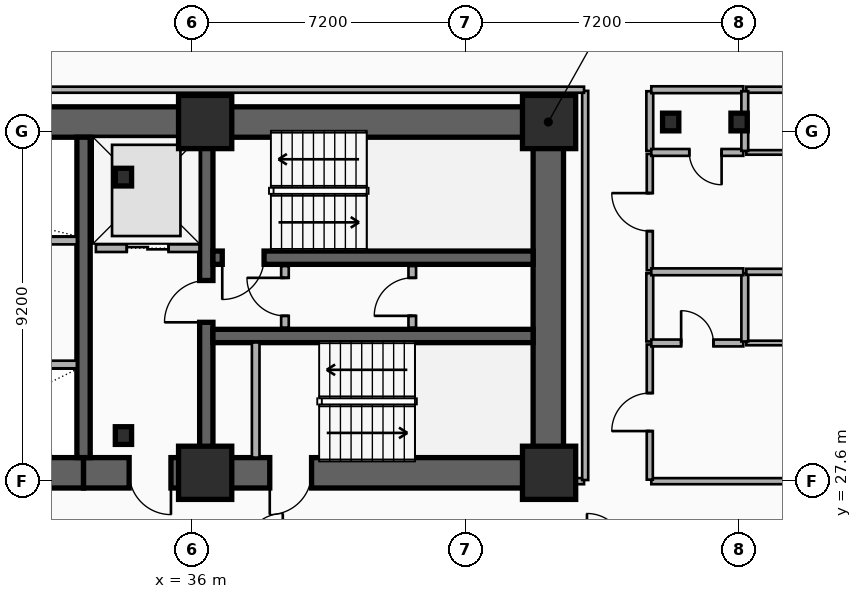
"""IFC4 building model, lengths in metres.
Left out: names, types, materials, properties, quantities, classifications, styles, units other than length and angle.
Written with IfcOpenShell. Run it as: python <this file> out.ifc"""

import sys

from ifc_helpers import new_model, si_unit, direction, frame, frame_2d, origin, origin_2d, place, context, subcontext, project, spatial, rectangle, i_section, extrude, element, fill, save


model = new_model("IFC4")
c1 = context("Model", 3, precision=1e-05, world=origin(), true_north=direction((0.0, 1.0)))
c2 = subcontext(c1, "Body", "Model", "MODEL_VIEW")
j1 = project(units=[si_unit("LENGTHUNIT", "METRE"), si_unit("PLANEANGLEUNIT", "RADIAN")], contexts=[c1])
p1 = place(None, origin())
s1 = spatial("IfcSite", under=j1, at=p1, CompositionType="ELEMENT")
p2 = place(p1, origin())
s2 = spatial("IfcBuilding", under=s1, at=p2, CompositionType="ELEMENT")
p3 = place(p2, frame((0.0, 0.0, 32.5)))
s3 = spatial("IfcBuildingStorey", under=s2, at=p3, CompositionType="ELEMENT", Elevation=32.5)
p4 = place(p3, frame((12.15, 37.05, 0.0), z_axis=(0.0, 0.0, 1.0), x_axis=(1.0, 0.0, 0.0)))
e1 = element("IfcWall", 1, at=p4, inside=s3, PredefinedType="SHEAR", context=c2, shape_type="SweptSolid", body=[
    extrude(rectangle(XDim=33.23, YDim=0.8, at=frame_2d((16.615, 0.0))), origin(), (0.0, 0.0, 1.0), 3.5),
])
p5 = place(p3, frame((33.15, 27.82, 0.0), z_axis=(0.0, 0.0, 1.0), x_axis=(-1.0, 0.0, 0.0)))
e2 = element("IfcWall", 2, at=p5, inside=s3, PredefinedType="SHEAR", context=c2, shape_type="SweptSolid", body=[
    extrude(rectangle(XDim=11.97, YDim=0.8, at=frame_2d((5.985, 0.0))), origin(), (0.0, 0.0, 1.0), 3.5),
])
p6 = place(p5, frame((6.1, 0.0, 0.0)))
e3 = element("IfcOpeningElement", 3, at=p6, cuts=e2, PredefinedType="OPENING", context=c2, shape_type="SweptSolid", body=[
    extrude(rectangle(XDim=1.6, YDim=2.2, at=frame_2d((0.8, 1.1))), frame((0.0, 0.41, 0.0), z_axis=(0.0, -1.0, 0.0), x_axis=(1.0, 0.0, 0.0)), (0.0, 0.0, 1.0), 0.82),
])
p7 = place(p3, frame((45.38, 27.82, 0.0), z_axis=(0.0, 0.0, 1.0), x_axis=(-1.0, 0.0, 0.0)))
e4 = element("IfcWall", 4, at=p7, inside=s3, PredefinedType="SHEAR", context=c2, shape_type="SweptSolid", body=[
    extrude(rectangle(XDim=12.23, YDim=0.8, at=frame_2d((6.115, 0.0))), origin(), (0.0, 0.0, 1.0), 3.5),
])
p8 = place(p7, frame((9.93, 0.0, 0.0)))
e5 = element("IfcOpeningElement", 5, at=p8, cuts=e4, PredefinedType="OPENING", context=c2, shape_type="SweptSolid", body=[
    extrude(rectangle(XDim=1.1, YDim=2.15, at=frame_2d((0.55, 1.075))), frame((0.0, 0.41, 0.0), z_axis=(0.0, -1.0, 0.0), x_axis=(1.0, 0.0, 0.0)), (0.0, 0.0, 1.0), 0.82),
])
p9 = place(p7, frame((6.23, 0.0, 0.0)))
e6 = element("IfcOpeningElement", 6, at=p9, cuts=e4, PredefinedType="OPENING", context=c2, shape_type="SweptSolid", body=[
    extrude(rectangle(XDim=1.1, YDim=2.15, at=frame_2d((0.55, 1.075))), frame((0.0, 0.41, 0.0), z_axis=(0.0, -1.0, 0.0), x_axis=(1.0, 0.0, 0.0)), (0.0, 0.0, 1.0), 0.82),
])
p10 = place(p3, frame((45.38, 28.22, 0.0), z_axis=(0.0, 0.0, 1.0), x_axis=(0.0, 1.0, 0.0)))
e7 = element("IfcWall", 7, at=p10, inside=s3, PredefinedType="SHEAR", context=c2, shape_type="SweptSolid", body=[
    extrude(rectangle(XDim=8.43, YDim=0.8, at=frame_2d((4.215, 0.0))), origin(), (0.0, 0.0, 1.0), 3.5),
])
p11 = place(p3, frame((33.15, 28.22, 0.0), z_axis=(0.0, 0.0, 1.0), x_axis=(0.0, 1.0, 0.0)))
e8 = element("IfcWall", 8, at=p11, inside=s3, PredefinedType="SHEAR", context=c2, shape_type="SweptSolid", body=[
    extrude(rectangle(XDim=8.43, YDim=0.35, at=frame_2d((4.215, 0.0))), origin(), (0.0, 0.0, 1.0), 3.5),
])
p12 = place(p3, frame((36.38, 28.22, 0.0), z_axis=(0.0, 0.0, 1.0), x_axis=(0.0, 1.0, 0.0)))
e9 = element("IfcWall", 9, at=p12, inside=s3, PredefinedType="SHEAR", context=c2, shape_type="SweptSolid", body=[
    extrude(rectangle(XDim=8.43, YDim=0.35, at=frame_2d((4.215, 0.0))), origin(), (0.0, 0.0, 1.0), 3.5),
])
p13 = place(p12, frame((3.56, 0.0, 0.0)))
e10 = element("IfcOpeningElement", 10, at=p13, cuts=e9, PredefinedType="OPENING", context=c2, shape_type="SweptSolid", body=[
    extrude(rectangle(XDim=1.1, YDim=2.15, at=frame_2d((0.55, 1.075))), frame((0.0, 0.185, 0.0), z_axis=(0.0, -1.0, 0.0), x_axis=(1.0, 0.0, 0.0)), (0.0, 0.0, 1.0), 0.37),
])
p14 = place(p3, frame((44.98, 33.48, 0.0), z_axis=(0.0, 0.0, 1.0), x_axis=(-1.0, 0.0, 0.0)))
e11 = element("IfcWall", 11, at=p14, inside=s3, PredefinedType="SHEAR", context=c2, shape_type="SweptSolid", body=[
    extrude(rectangle(XDim=8.425, YDim=0.35, at=frame_2d((4.212, 0.0))), origin(), (0.0, 0.0, 1.0), 3.5),
])
p15 = place(p14, frame((7.08, 0.0, 0.0)))
e12 = element("IfcOpeningElement", 12, at=p15, cuts=e11, PredefinedType="OPENING", context=c2, shape_type="SweptSolid", body=[
    extrude(rectangle(XDim=1.1, YDim=2.15, at=frame_2d((0.55, 1.075))), frame((0.0, 0.185, 0.0), z_axis=(0.0, -1.0, 0.0), x_axis=(1.0, 0.0, 0.0)), (0.0, 0.0, 1.0), 0.37),
])
p16 = place(p3, frame((36.555, 31.42, 0.0), z_axis=(0.0, 0.0, 1.0), x_axis=(1.0, 0.0, 0.0)))
e13 = element("IfcWall", 13, at=p16, inside=s3, PredefinedType="SHEAR", context=c2, shape_type="SweptSolid", body=[
    extrude(rectangle(XDim=8.425, YDim=0.35, at=frame_2d((4.212, 0.0))), origin(), (0.0, 0.0, 1.0), 3.5),
])
for number, where, z_axis, x_axis in (
    (14, (34.2, 28.8, 0.0), (0.0, 0.0, 1.0), (1.0, 0.0, 0.0)),
    (15, (34.2, 35.6, 0.0), (0.0, 0.0, 1.0), (1.0, 0.0, 0.0)),
):
    element("IfcColumn", number, at=place(p3, frame(where, z_axis=z_axis, x_axis=x_axis)), inside=s3, PredefinedType="COLUMN", context=c2, shape_type="SweptSolid", body=[
        extrude(i_section(OverallWidth=0.428, OverallDepth=0.465, WebThickness=0.045, FlangeThickness=0.073, FilletRadius=0.015, at=origin_2d()), origin(), (0.0, 0.0, 1.0), 3.5),
    ])
for number, where, z_axis, x_axis in (
    (16, (36.35, 27.82, 0.0), (0.0, 0.0, 1.0), (1.0, 0.0, 0.0)),
    (17, (36.35, 37.05, 0.0), (0.0, 0.0, 1.0), (1.0, 0.0, 0.0)),
    (18, (45.4, 27.82, 0.0), (0.0, 0.0, 1.0), (1.0, 0.0, 0.0)),
    (19, (45.4, 37.05, 0.0), (0.0, 0.0, 1.0), (1.0, 0.0, 0.0)),
):
    element("IfcColumn", number, at=place(p3, frame(where, z_axis=z_axis, x_axis=x_axis)), inside=s3, PredefinedType="COLUMN", context=c2, shape_type="SweptSolid", body=[
        extrude(rectangle(XDim=1.4, YDim=1.4, at=origin_2d()), origin(), (0.0, 0.0, 1.0), 3.5),
    ])
for number, where, z_axis, x_axis in (
    (20, (48.6, 37.05, 0.0), (0.0, 0.0, 1.0), (1.0, 0.0, 0.0)),
    (21, (50.4, 37.05, 0.0), (0.0, 0.0, 1.0), (1.0, 0.0, 0.0)),
):
    element("IfcColumn", number, at=place(p3, frame(where, z_axis=z_axis, x_axis=x_axis)), inside=s3, PredefinedType="COLUMN", context=c2, shape_type="SweptSolid", body=[
        extrude(i_section(OverallWidth=0.428, OverallDepth=0.465, WebThickness=0.045, FlangeThickness=0.073, FilletRadius=0.015, at=origin_2d()), origin(), (0.0, 0.0, 1.0), 3.5),
    ])
p17 = place(p3, frame((33.475, 33.73, 0.0), z_axis=(0.0, 0.0, 1.0), x_axis=(1.0, 0.0, 0.0)))
e22 = element("IfcWall", 22, at=p17, inside=s3, PredefinedType="PARTITIONING", context=c2, shape_type="SweptSolid", body=[
    extrude(rectangle(XDim=2.725, YDim=0.2, at=frame_2d((1.362, 0.0))), origin(), (0.0, 0.0, 1.0), 2.212),
])
p18 = place(p17, frame((0.812, 0.0, 0.0)))
e23 = element("IfcOpeningElement", 23, at=p18, cuts=e22, PredefinedType="OPENING", context=c2, shape_type="SweptSolid", body=[
    extrude(rectangle(XDim=1.1, YDim=2.15, at=frame_2d((0.55, 1.075))), frame((0.0, 0.11, 0.0), z_axis=(0.0, -1.0, 0.0), x_axis=(1.0, 0.0, 0.0)), (0.0, 0.0, 1.0), 0.22),
])
p19 = place(p3, frame((31.775, 30.67, 0.0), z_axis=(0.0, 0.0, 1.0), x_axis=(1.0, 0.0, 0.0)))
e24 = element("IfcWall", 24, at=p19, inside=s3, PredefinedType="PARTITIONING", context=c2, shape_type="SweptSolid", body=[
    extrude(rectangle(XDim=1.2, YDim=0.2, at=frame_2d((0.6, 0.0))), origin(), (0.0, 0.0, 1.0), 2.62),
])
p20 = place(p3, frame((31.775, 33.93, 0.0), z_axis=(0.0, 0.0, 1.0), x_axis=(1.0, 0.0, 0.0)))
e25 = element("IfcWall", 25, at=p20, inside=s3, PredefinedType="PARTITIONING", context=c2, shape_type="SweptSolid", body=[
    extrude(rectangle(XDim=1.2, YDim=0.2, at=frame_2d((0.6, 0.0))), origin(), (0.0, 0.0, 1.0), 3.24),
])
p21 = place(p3, frame((37.68, 28.22, 0.0), z_axis=(0.0, 0.0, 1.0), x_axis=(0.0, 1.0, 0.0)))
e26 = element("IfcWall", 26, at=p21, inside=s3, PredefinedType="PARTITIONING", context=c2, shape_type="SweptSolid", body=[
    extrude(rectangle(XDim=3.03, YDim=0.2, at=frame_2d((1.515, 0.0))), origin(), (0.0, 0.0, 1.0), 2.62),
])
p22 = place(p3, frame((38.45, 31.64, 0.0), z_axis=(0.0, 0.0, 1.0), x_axis=(0.0, 1.0, 0.0)))
e27 = element("IfcWall", 27, at=p22, inside=s3, PredefinedType="PARTITIONING", context=c2, shape_type="SweptSolid", body=[
    extrude(rectangle(XDim=1.62, YDim=0.2, at=frame_2d((0.81, 0.0))), origin(), (0.0, 0.0, 1.0), 3.24),
])
p23 = place(p22, frame((0.31, 0.0, 0.0)))
e28 = element("IfcOpeningElement", 28, at=p23, cuts=e27, PredefinedType="OPENING", context=c2, shape_type="SweptSolid", body=[
    extrude(rectangle(XDim=1.0, YDim=2.15, at=frame_2d((0.5, 1.075))), frame((0.0, 0.11, 0.0), z_axis=(0.0, -1.0, 0.0), x_axis=(1.0, 0.0, 0.0)), (0.0, 0.0, 1.0), 0.22),
])
p24 = place(p3, frame((41.8, 31.64, 0.0), z_axis=(0.0, 0.0, 1.0), x_axis=(0.0, 1.0, 0.0)))
e29 = element("IfcWall", 29, at=p24, inside=s3, PredefinedType="PARTITIONING", context=c2, shape_type="SweptSolid", body=[
    extrude(rectangle(XDim=1.62, YDim=0.2, at=frame_2d((0.81, 0.0))), origin(), (0.0, 0.0, 1.0), 3.24),
])
p25 = place(p24, frame((0.31, 0.0, 0.0)))
e30 = element("IfcOpeningElement", 30, at=p25, cuts=e29, PredefinedType="OPENING", context=c2, shape_type="SweptSolid", body=[
    extrude(rectangle(XDim=1.0, YDim=2.15, at=frame_2d((0.5, 1.075))), frame((0.0, 0.11, 0.0), z_axis=(0.0, -1.0, 0.0), x_axis=(1.0, 0.0, 0.0)), (0.0, 0.0, 1.0), 0.22),
])
p26 = place(p3, frame((48.09, 27.6, 0.0), z_axis=(0.0, 0.0, 1.0), x_axis=(1.0, 0.0, 0.0)))
e31 = element("IfcWall", 31, at=p26, inside=s3, PredefinedType="PARTITIONING", context=c2, shape_type="SweptSolid", body=[
    extrude(rectangle(XDim=9.25, YDim=0.16, at=frame_2d((4.625, 0.0))), origin(), (0.0, 0.0, 1.0), 2.57),
])
p27 = place(p26, frame((4.125, 0.0, 0.0)))
e32 = element("IfcOpeningElement", 32, at=p27, cuts=e31, PredefinedType="OPENING", context=c2, shape_type="SweptSolid", body=[
    extrude(rectangle(XDim=1.0, YDim=2.15, at=frame_2d((0.5, 1.075))), frame((0.0, 0.09, 0.0), z_axis=(0.0, -1.0, 0.0), x_axis=(1.0, 0.0, 0.0)), (0.0, 0.0, 1.0), 0.18),
])
p28 = place(p3, frame((48.05, 27.64, 0.0), z_axis=(0.0, 0.0, 1.0), x_axis=(0.0, 1.0, 0.0)))
e33 = element("IfcWall", 33, at=p28, inside=s3, PredefinedType="PARTITIONING", context=c2, shape_type="SweptSolid", body=[
    extrude(rectangle(XDim=3.556, YDim=0.16, at=frame_2d((1.778, 0.0))), origin(), (0.0, 0.0, 1.0), 3.24),
])
p29 = place(p28, frame((1.278, 0.0, 0.0)))
e34 = element("IfcOpeningElement", 34, at=p29, cuts=e33, PredefinedType="OPENING", context=c2, shape_type="SweptSolid", body=[
    extrude(rectangle(XDim=1.0, YDim=2.15, at=frame_2d((0.5, 1.075))), frame((0.0, 0.09, 0.0), z_axis=(0.0, -1.0, 0.0), x_axis=(1.0, 0.0, 0.0)), (0.0, 0.0, 1.0), 0.18),
])
p30 = place(p3, frame((48.05, 31.276, 0.0), z_axis=(0.0, 0.0, 1.0), x_axis=(0.0, 1.0, 0.0)))
e35 = element("IfcWall", 35, at=p30, inside=s3, PredefinedType="PLUMBINGWALL", context=c2, shape_type="SweptSolid", body=[
    extrude(rectangle(XDim=1.793, YDim=0.18, at=frame_2d((0.896, 0.0))), origin(), (0.0, 0.0, 1.0), 3.24),
])
p31 = place(p3, frame((48.05, 33.149, 0.0), z_axis=(0.0, 0.0, 1.0), x_axis=(0.0, 1.0, 0.0)))
e36 = element("IfcWall", 36, at=p31, inside=s3, PredefinedType="PARTITIONING", context=c2, shape_type="SweptSolid", body=[
    extrude(rectangle(XDim=3.061, YDim=0.16, at=frame_2d((1.531, 0.0))), origin(), (0.0, 0.0, 1.0), 3.24),
])
p32 = place(p31, frame((1.031, 0.0, 0.0)))
e37 = element("IfcOpeningElement", 37, at=p32, cuts=e36, PredefinedType="OPENING", context=c2, shape_type="SweptSolid", body=[
    extrude(rectangle(XDim=1.0, YDim=2.15, at=frame_2d((0.5, 1.075))), frame((0.0, 0.09, 0.0), z_axis=(0.0, -1.0, 0.0), x_axis=(1.0, 0.0, 0.0)), (0.0, 0.0, 1.0), 0.18),
])
p33 = place(p3, frame((48.05, 36.29, 0.0), z_axis=(0.0, 0.0, 1.0), x_axis=(0.0, 1.0, 0.0)))
e38 = element("IfcWall", 38, at=p33, inside=s3, PredefinedType="PLUMBINGWALL", context=c2, shape_type="SweptSolid", body=[
    extrude(rectangle(XDim=1.57, YDim=0.18, at=frame_2d((0.785, 0.0))), origin(), (0.0, 0.0, 1.0), 2.72),
])
p34 = place(p3, frame((48.09, 37.9, 0.0), z_axis=(0.0, 0.0, 1.0), x_axis=(1.0, 0.0, 0.0)))
e39 = element("IfcWall", 39, at=p34, inside=s3, PredefinedType="PLUMBINGWALL", context=c2, shape_type="SweptSolid", body=[
    extrude(rectangle(XDim=2.42, YDim=0.18, at=frame_2d((1.21, 0.0))), origin(), (0.0, 0.0, 1.0), 3.24),
])
p35 = place(p3, frame((50.59, 37.9, 0.0), z_axis=(0.0, 0.0, 1.0), x_axis=(1.0, 0.0, 0.0)))
e40 = element("IfcWall", 40, at=p35, inside=s3, PredefinedType="PARTITIONING", context=c2, shape_type="SweptSolid", body=[
    extrude(rectangle(XDim=6.75, YDim=0.16, at=frame_2d((3.375, 0.0))), origin(), (0.0, 0.0, 1.0), 3.24),
])
p36 = place(p3, frame((48.09, 31.236, 0.0), z_axis=(0.0, 0.0, 1.0), x_axis=(1.0, 0.0, 0.0)))
e41 = element("IfcWall", 41, at=p36, inside=s3, PredefinedType="PLUMBINGWALL", context=c2, shape_type="SweptSolid", body=[
    extrude(rectangle(XDim=2.42, YDim=0.18, at=frame_2d((1.21, 0.0))), origin(), (0.0, 0.0, 1.0), 2.57),
])
p37 = place(p36, frame((0.785, 0.0, 0.0)))
e42 = element("IfcOpeningElement", 42, at=p37, cuts=e41, PredefinedType="OPENING", context=c2, shape_type="SweptSolid", body=[
    extrude(rectangle(XDim=0.85, YDim=2.1, at=frame_2d((0.425, 1.05))), frame((0.0, 0.1, 0.0), z_axis=(0.0, -1.0, 0.0), x_axis=(1.0, 0.0, 0.0)), (0.0, 0.0, 1.0), 0.2),
])
p38 = place(p3, frame((50.59, 31.236, 0.0), z_axis=(0.0, 0.0, 1.0), x_axis=(1.0, 0.0, 0.0)))
e43 = element("IfcWall", 43, at=p38, inside=s3, PredefinedType="PARTITIONING", context=c2, shape_type="SweptSolid", body=[
    extrude(rectangle(XDim=6.75, YDim=0.12, at=frame_2d((3.375, 0.0))), origin(), (0.0, 0.0, 1.0), 2.57),
])
p39 = place(p38, frame((2.925, 0.0, 0.0)))
e44 = element("IfcOpeningElement", 44, at=p39, cuts=e43, PredefinedType="OPENING", context=c2, shape_type="SweptSolid", body=[
    extrude(rectangle(XDim=0.9, YDim=2.1, at=frame_2d((0.45, 1.05))), frame((0.0, 0.07, 0.0), z_axis=(0.0, -1.0, 0.0), x_axis=(1.0, 0.0, 0.0)), (0.0, 0.0, 1.0), 0.14),
])
p40 = place(p3, frame((50.55, 31.276, 0.0), z_axis=(0.0, 0.0, 1.0), x_axis=(0.0, 1.0, 0.0)))
e45 = element("IfcWall", 45, at=p40, inside=s3, PredefinedType="PLUMBINGWALL", context=c2, shape_type="SweptSolid", body=[
    extrude(rectangle(XDim=1.793, YDim=0.18, at=frame_2d((0.896, 0.0))), origin(), (0.0, 0.0, 1.0), 2.57),
])
p41 = place(p3, frame((48.09, 33.109, 0.0), z_axis=(0.0, 0.0, 1.0), x_axis=(1.0, 0.0, 0.0)))
e46 = element("IfcWall", 46, at=p41, inside=s3, PredefinedType="PLUMBINGWALL", context=c2, shape_type="SweptSolid", body=[
    extrude(rectangle(XDim=2.42, YDim=0.18, at=frame_2d((1.21, 0.0))), origin(), (0.0, 0.0, 1.0), 2.57),
])
p42 = place(p3, frame((50.59, 33.109, 0.0), z_axis=(0.0, 0.0, 1.0), x_axis=(1.0, 0.0, 0.0)))
e47 = element("IfcWall", 47, at=p42, inside=s3, PredefinedType="PARTITIONING", context=c2, shape_type="SweptSolid", body=[
    extrude(rectangle(XDim=6.75, YDim=0.16, at=frame_2d((3.375, 0.0))), origin(), (0.0, 0.0, 1.0), 2.57),
])
p43 = place(p3, frame((50.51, 36.25, 0.0), z_axis=(0.0, 0.0, 1.0), x_axis=(-1.0, 0.0, 0.0)))
e48 = element("IfcWall", 48, at=p43, inside=s3, PredefinedType="PLUMBINGWALL", context=c2, shape_type="SweptSolid", body=[
    extrude(rectangle(XDim=2.42, YDim=0.18, at=frame_2d((1.21, 0.0))), origin(), (0.0, 0.0, 1.0), 2.57),
])
p44 = place(p43, frame((0.57, 0.0, 0.0)))
e49 = element("IfcOpeningElement", 49, at=p44, cuts=e48, PredefinedType="OPENING", context=c2, shape_type="SweptSolid", body=[
    extrude(rectangle(XDim=0.85, YDim=2.1, at=frame_2d((0.425, 1.05))), frame((0.0, 0.1, 0.0), z_axis=(0.0, -1.0, 0.0), x_axis=(1.0, 0.0, 0.0)), (0.0, 0.0, 1.0), 0.2),
])
p45 = place(p3, frame((50.59, 36.25, 0.0), z_axis=(0.0, 0.0, 1.0), x_axis=(1.0, 0.0, 0.0)))
e50 = element("IfcWall", 50, at=p45, inside=s3, PredefinedType="PARTITIONING", context=c2, shape_type="SweptSolid", body=[
    extrude(rectangle(XDim=6.75, YDim=0.12, at=frame_2d((3.375, 0.0))), origin(), (0.0, 0.0, 1.0), 2.57),
])
p46 = place(p45, frame((2.925, 0.0, 0.0)))
e51 = element("IfcOpeningElement", 51, at=p46, cuts=e50, PredefinedType="OPENING", context=c2, shape_type="SweptSolid", body=[
    extrude(rectangle(XDim=0.9, YDim=2.1, at=frame_2d((0.45, 1.05))), frame((0.0, 0.07, 0.0), z_axis=(0.0, -1.0, 0.0), x_axis=(1.0, 0.0, 0.0)), (0.0, 0.0, 1.0), 0.14),
])
p47 = place(p3, frame((50.55, 36.29, 0.0), z_axis=(0.0, 0.0, 1.0), x_axis=(0.0, 1.0, 0.0)))
e52 = element("IfcWall", 52, at=p47, inside=s3, PredefinedType="PLUMBINGWALL", context=c2, shape_type="SweptSolid", body=[
    extrude(rectangle(XDim=1.57, YDim=0.18, at=frame_2d((0.785, 0.0))), origin(), (0.0, 0.0, 1.0), 2.57),
])
p48 = place(p3, frame((45.41, 27.6, 0.0), z_axis=(0.0, 0.0, 1.0), x_axis=(1.0, 0.0, 0.0)))
e53 = element("IfcWall", 53, at=p48, inside=s3, PredefinedType="PARTITIONING", context=c2, shape_type="SweptSolid", body=[
    extrude(rectangle(XDim=0.91, YDim=0.16, at=frame_2d((0.455, 0.0))), origin(), (0.0, 0.0, 1.0), 2.28),
])
p49 = place(p3, frame((46.35, 27.63, 0.0), z_axis=(0.0, 0.0, 1.0), x_axis=(0.0, 1.0, 0.0)))
e54 = element("IfcWall", 54, at=p49, inside=s3, PredefinedType="PARTITIONING", context=c2, shape_type="SweptSolid", body=[
    extrude(rectangle(XDim=10.24, YDim=0.16, at=frame_2d((5.12, 0.0))), origin(), (0.0, 0.0, 1.0), 2.72),
])
p50 = place(p3, frame((11.28, 37.9, 0.0), z_axis=(0.0, 0.0, 1.0), x_axis=(1.0, 0.0, 0.0)))
e55 = element("IfcWall", 55, at=p50, inside=s3, PredefinedType="PARTITIONING", context=c2, shape_type="SweptSolid", body=[
    extrude(rectangle(XDim=35.04, YDim=0.16, at=frame_2d((17.52, 0.0))), origin(), (0.0, 0.0, 1.0), 3.24),
])
p51 = place(p18, origin())
e56 = element("IfcDoor", 56, at=p51, inside=s3, OperationType="DOUBLE_DOOR_SLIDING", PredefinedType="DOOR", context=c2, shape_type="SweptSolid", body=[
    extrude(rectangle(XDim=1.1, YDim=2.15, at=frame_2d((0.55, 1.075))), frame((0.0, 0.025, 0.0), z_axis=(0.0, -1.0, 0.0), x_axis=(1.0, 0.0, 0.0)), (0.0, 0.0, 1.0), 0.05),
])
fill(e23, e56)
p52 = place(p15, origin())
e57 = element("IfcDoor", 57, at=p52, inside=s3, OperationType="SINGLE_SWING_RIGHT", PredefinedType="DOOR", context=c2, shape_type="SweptSolid", body=[
    extrude(rectangle(XDim=1.1, YDim=2.15, at=frame_2d((0.55, 1.075))), frame((0.0, 0.025, 0.0), z_axis=(0.0, -1.0, 0.0), x_axis=(1.0, 0.0, 0.0)), (0.0, 0.0, 1.0), 0.05),
])
fill(e12, e57)
p53 = place(p13, origin())
e58 = element("IfcDoor", 58, at=p53, inside=s3, OperationType="SINGLE_SWING_LEFT", PredefinedType="DOOR", context=c2, shape_type="SweptSolid", body=[
    extrude(rectangle(XDim=1.1, YDim=2.15, at=frame_2d((0.55, 1.075))), frame((0.0, 0.025, 0.0), z_axis=(0.0, -1.0, 0.0), x_axis=(1.0, 0.0, 0.0)), (0.0, 0.0, 1.0), 0.05),
])
fill(e10, e58)
p54 = place(p8, origin())
e59 = element("IfcDoor", 59, at=p54, inside=s3, OperationType="SINGLE_SWING_LEFT", PredefinedType="DOOR", context=c2, shape_type="SweptSolid", body=[
    extrude(rectangle(XDim=1.1, YDim=2.15, at=frame_2d((0.55, 1.075))), frame((0.0, 0.025, 0.0), z_axis=(0.0, -1.0, 0.0), x_axis=(1.0, 0.0, 0.0)), (0.0, 0.0, 1.0), 0.05),
])
fill(e5, e59)
p55 = place(p9, origin())
e60 = element("IfcDoor", 60, at=p55, inside=s3, OperationType="SINGLE_SWING_RIGHT", PredefinedType="DOOR", context=c2, shape_type="SweptSolid", body=[
    extrude(rectangle(XDim=1.1, YDim=2.15, at=frame_2d((0.55, 1.075))), frame((0.0, 0.025, 0.0), z_axis=(0.0, -1.0, 0.0), x_axis=(1.0, 0.0, 0.0)), (0.0, 0.0, 1.0), 0.05),
])
fill(e6, e60)
p56 = place(p23, origin())
e61 = element("IfcDoor", 61, at=p56, inside=s3, OperationType="SINGLE_SWING_RIGHT", PredefinedType="DOOR", context=c2, shape_type="SweptSolid", body=[
    extrude(rectangle(XDim=1.0, YDim=2.15, at=frame_2d((0.5, 1.075))), frame((0.0, 0.025, 0.0), z_axis=(0.0, -1.0, 0.0), x_axis=(1.0, 0.0, 0.0)), (0.0, 0.0, 1.0), 0.05),
])
fill(e28, e61)
p57 = place(p25, origin())
e62 = element("IfcDoor", 62, at=p57, inside=s3, OperationType="SINGLE_SWING_LEFT", PredefinedType="DOOR", context=c2, shape_type="SweptSolid", body=[
    extrude(rectangle(XDim=1.0, YDim=2.15, at=frame_2d((0.5, 1.075))), frame((0.0, 0.025, 0.0), z_axis=(0.0, -1.0, 0.0), x_axis=(1.0, 0.0, 0.0)), (0.0, 0.0, 1.0), 0.05),
])
fill(e30, e62)
p58 = place(p29, origin())
e63 = element("IfcDoor", 63, at=p58, inside=s3, OperationType="SINGLE_SWING_LEFT", PredefinedType="DOOR", context=c2, shape_type="SweptSolid", body=[
    extrude(rectangle(XDim=1.0, YDim=2.15, at=frame_2d((0.5, 1.075))), frame((0.0, 0.025, 0.0), z_axis=(0.0, -1.0, 0.0), x_axis=(1.0, 0.0, 0.0)), (0.0, 0.0, 1.0), 0.05),
])
fill(e34, e63)
p59 = place(p32, origin())
e64 = element("IfcDoor", 64, at=p59, inside=s3, OperationType="SINGLE_SWING_RIGHT", PredefinedType="DOOR", context=c2, shape_type="SweptSolid", body=[
    extrude(rectangle(XDim=1.0, YDim=2.15, at=frame_2d((0.5, 1.075))), frame((0.0, 0.025, 0.0), z_axis=(0.0, -1.0, 0.0), x_axis=(1.0, 0.0, 0.0)), (0.0, 0.0, 1.0), 0.05),
])
fill(e37, e64)
p60 = place(p37, origin())
e65 = element("IfcDoor", 65, at=p60, inside=s3, OperationType="SINGLE_SWING_LEFT", PredefinedType="DOOR", context=c2, shape_type="SweptSolid", body=[
    extrude(rectangle(XDim=0.85, YDim=2.1, at=frame_2d((0.425, 1.05))), frame((0.0, 0.025, 0.0), z_axis=(0.0, -1.0, 0.0), x_axis=(1.0, 0.0, 0.0)), (0.0, 0.0, 1.0), 0.05),
])
fill(e42, e65)
p61 = place(p44, origin())
e66 = element("IfcDoor", 66, at=p61, inside=s3, OperationType="SINGLE_SWING_LEFT", PredefinedType="DOOR", context=c2, shape_type="SweptSolid", body=[
    extrude(rectangle(XDim=0.85, YDim=2.1, at=frame_2d((0.425, 1.05))), frame((0.0, 0.025, 0.0), z_axis=(0.0, -1.0, 0.0), x_axis=(1.0, 0.0, 0.0)), (0.0, 0.0, 1.0), 0.05),
])
fill(e49, e66)
save(model, sys.argv[1])
